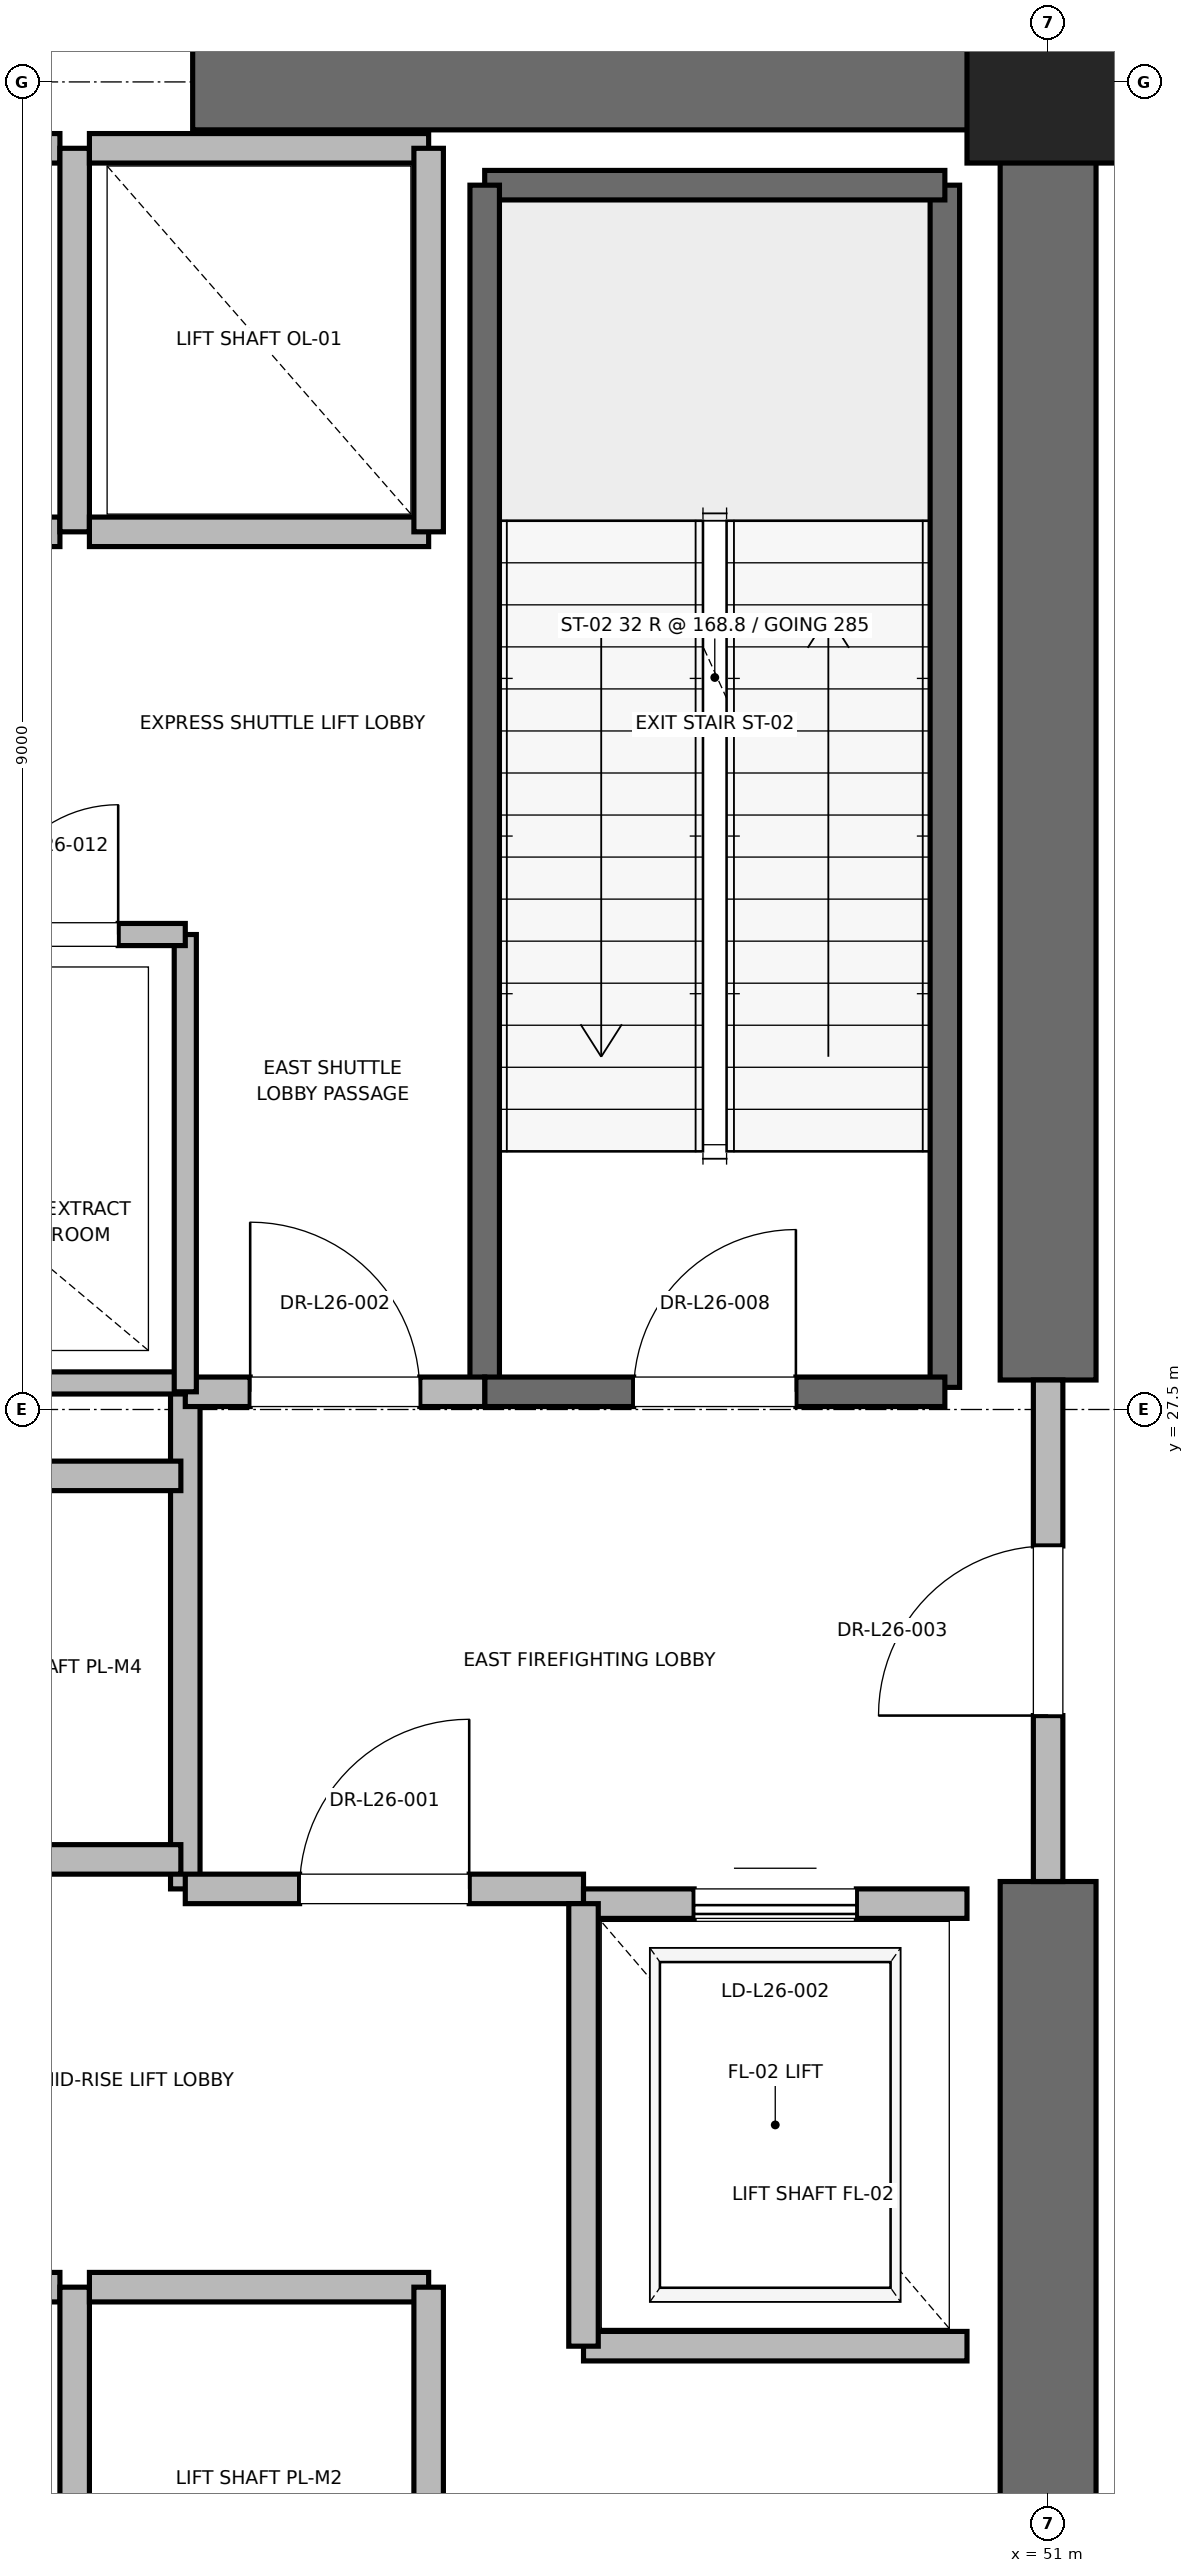
"""IFC4 building model, lengths in metres.
Left out: names, types, materials, properties, quantities, classifications, styles, units other than length and angle.
Written with IfcOpenShell. Run it as: python <this file> out.ifc"""

import sys

from ifc_helpers import new_model, si_unit, direction, frame, frame_2d, origin, origin_2d, place, context, subcontext, project, spatial, rectangle, extrude, element, fill, save


model = new_model("IFC4")
c1 = context("Model", 3, precision=1e-05, world=origin(), true_north=direction((0.0, 1.0)))
c2 = subcontext(c1, "Body", "Model", "MODEL_VIEW")
j1 = project(units=[si_unit("LENGTHUNIT", "METRE"), si_unit("PLANEANGLEUNIT", "RADIAN")], contexts=[c1])
p1 = place(None, origin())
s1 = spatial("IfcSite", under=j1, at=p1, CompositionType="ELEMENT")
p2 = place(p1, origin())
s2 = spatial("IfcBuilding", under=s1, at=p2, CompositionType="ELEMENT")
p3 = place(p2, frame((0.0, 0.0, 113.0)))
s3 = spatial("IfcBuildingStorey", under=s2, at=p3, CompositionType="ELEMENT", Elevation=113.0)
p4 = place(p3, frame((51.0, 36.5, 0.0), z_axis=(0.0, 0.0, 1.0), x_axis=(1.0, 0.0, 0.0)))
e1 = element("IfcColumn", 1, at=p4, inside=s3, PredefinedType="PILASTER", context=c2, shape_type="SweptSolid", body=[
    extrude(rectangle(XDim=1.1, YDim=1.1, at=origin_2d()), origin(), (0.0, 0.0, 1.0), 5.4),
])
for number, where, z_axis, x_axis in (
    (2, (45.2, 36.5, 0.0), (0.0, 0.0, 1.0), (1.0, 0.0, 0.0)),
    (3, (51.0, 18.5, 0.0), (0.0, 0.0, 1.0), (0.0, 1.0, 0.0)),
):
    element("IfcWall", number, at=place(p3, frame(where, z_axis=z_axis, x_axis=x_axis)), inside=s3, PredefinedType="SHEAR", context=c2, shape_type="SweptSolid", body=[
        extrude(rectangle(XDim=5.8, YDim=0.65, at=frame_2d((2.9, 0.0))), origin(), (0.0, 0.0, 1.0), 5.1),
    ])
p5 = place(p3, frame((51.0, 27.7, 0.0), z_axis=(0.0, 0.0, 1.0), x_axis=(0.0, 1.0, 0.0)))
e4 = element("IfcWall", 4, at=p5, inside=s3, PredefinedType="SHEAR", context=c2, shape_type="SweptSolid", body=[
    extrude(rectangle(XDim=8.8, YDim=0.65, at=frame_2d((4.4, 0.0))), origin(), (0.0, 0.0, 1.0), 5.1),
])
p6 = place(p3, frame((50.3, 27.65, 0.0), z_axis=(0.0, 0.0, 1.0), x_axis=(0.0, 1.0, 0.0)))
e5 = element("IfcWall", 5, at=p6, inside=s3, PredefinedType="SOLIDWALL", context=c2, shape_type="SweptSolid", body=[
    extrude(rectangle(XDim=8.15, YDim=0.2, at=frame_2d((4.075, 0.0))), origin(), (0.0, 0.0, 1.0), 5.1),
])
p7 = place(p3, frame((47.18, 35.8, 0.0), z_axis=(0.0, 0.0, 1.0), x_axis=(1.0, 0.0, 0.0)))
e6 = element("IfcWall", 6, at=p7, inside=s3, PredefinedType="SOLIDWALL", context=c2, shape_type="SweptSolid", body=[
    extrude(rectangle(XDim=3.12, YDim=0.2, at=frame_2d((1.56, 0.0))), origin(), (0.0, 0.0, 1.0), 5.1),
])
p8 = place(p3, frame((47.18, 27.62, 0.0), z_axis=(0.0, 0.0, 1.0), x_axis=(0.0, 1.0, 0.0)))
e7 = element("IfcWall", 7, at=p8, inside=s3, PredefinedType="SOLIDWALL", context=c2, shape_type="SweptSolid", body=[
    extrude(rectangle(XDim=8.18, YDim=0.2, at=frame_2d((4.09, 0.0))), origin(), (0.0, 0.0, 1.0), 5.1),
])
p9 = place(p3, frame((47.18, 27.62, 0.0), z_axis=(0.0, 0.0, 1.0), x_axis=(1.0, 0.0, 0.0)))
e8 = element("IfcWall", 8, at=p9, inside=s3, PredefinedType="SOLIDWALL", context=c2, shape_type="SweptSolid", body=[
    extrude(rectangle(XDim=3.12, YDim=0.2, at=frame_2d((1.56, 0.0))), origin(), (0.0, 0.0, 1.0), 5.1),
])
p10 = place(p9, frame((1.01, 0.0, 0.0)))
e9 = element("IfcOpeningElement", 9, at=p10, cuts=e8, PredefinedType="OPENING", context=c2, shape_type="SweptSolid", body=[
    extrude(rectangle(XDim=1.1, YDim=2.15, at=frame_2d((0.55, 1.075))), frame((0.0, 0.1, 0.0), z_axis=(0.0, -1.0, 0.0), x_axis=(1.0, 0.0, 0.0)), (0.0, 0.0, 1.0), 0.2),
])
p11 = place(p3, frame((45.15, 24.25, 0.0), z_axis=(0.0, 0.0, 1.0), x_axis=(0.0, 1.0, 0.0)))
e10 = element("IfcWall", 10, at=p11, inside=s3, PredefinedType="PARTITIONING", context=c2, shape_type="SweptSolid", body=[
    extrude(rectangle(XDim=3.37, YDim=0.2, at=frame_2d((1.685, 0.0))), origin(), (0.0, 0.0, 1.0), 5.1),
])
p12 = place(p3, frame((45.15, 24.25, 0.0), z_axis=(0.0, 0.0, 1.0), x_axis=(1.0, 0.0, 0.0)))
e11 = element("IfcWall", 11, at=p12, inside=s3, PredefinedType="PARTITIONING", context=c2, shape_type="SweptSolid", body=[
    extrude(rectangle(XDim=2.7, YDim=0.2, at=frame_2d((1.35, 0.0))), origin(), (0.0, 0.0, 1.0), 5.1),
])
p13 = place(p12, frame((0.775, 0.0, 0.0)))
e12 = element("IfcOpeningElement", 12, at=p13, cuts=e11, PredefinedType="OPENING", context=c2, shape_type="SweptSolid", body=[
    extrude(rectangle(XDim=1.15, YDim=2.2, at=frame_2d((0.575, 1.1))), frame((0.0, 0.1, 0.0), z_axis=(0.0, -1.0, 0.0), x_axis=(1.0, 0.0, 0.0)), (0.0, 0.0, 1.0), 0.2),
])
p14 = place(p3, frame((45.15, 27.62, 0.0), z_axis=(0.0, 0.0, 1.0), x_axis=(1.0, 0.0, 0.0)))
e13 = element("IfcWall", 13, at=p14, inside=s3, PredefinedType="PARTITIONING", context=c2, shape_type="SweptSolid", body=[
    extrude(rectangle(XDim=2.03, YDim=0.2, at=frame_2d((1.015, 0.0))), origin(), (0.0, 0.0, 1.0), 5.1),
])
p15 = place(p14, frame((0.44, 0.0, 0.0)))
e14 = element("IfcOpeningElement", 14, at=p15, cuts=e13, PredefinedType="OPENING", context=c2, shape_type="SweptSolid", body=[
    extrude(rectangle(XDim=1.15, YDim=2.2, at=frame_2d((0.575, 1.1))), frame((0.0, 0.1, 0.0), z_axis=(0.0, -1.0, 0.0), x_axis=(1.0, 0.0, 0.0)), (0.0, 0.0, 1.0), 0.2),
])
p16 = place(p3, frame((51.0, 24.3, 0.0), z_axis=(0.0, 0.0, 1.0), x_axis=(0.0, 1.0, 0.0)))
e15 = element("IfcWall", 15, at=p16, inside=s3, PredefinedType="PARTITIONING", context=c2, shape_type="SweptSolid", body=[
    extrude(rectangle(XDim=3.4, YDim=0.2, at=frame_2d((1.7, 0.0))), origin(), (0.0, 0.0, 1.0), 3.88),
])
p17 = place(p16, frame((1.125, 0.0, 0.0)))
e16 = element("IfcOpeningElement", 16, at=p17, cuts=e15, PredefinedType="OPENING", context=c2, shape_type="SweptSolid", body=[
    extrude(rectangle(XDim=1.15, YDim=2.2, at=frame_2d((0.575, 1.1))), frame((0.0, 0.1, 0.0), z_axis=(0.0, -1.0, 0.0), x_axis=(1.0, 0.0, 0.0)), (0.0, 0.0, 1.0), 0.2),
])
p18 = place(p3, frame((47.85, 21.15, 0.0), z_axis=(0.0, 0.0, 1.0), x_axis=(1.0, 0.0, 0.0)))
e17 = element("IfcWall", 17, at=p18, inside=s3, PredefinedType="SOLIDWALL", context=c2, shape_type="SweptSolid", body=[
    extrude(rectangle(XDim=2.6, YDim=0.2, at=frame_2d((1.3, 0.0))), origin(), (0.0, 0.0, 1.0), 5.1),
])
p19 = place(p3, frame((50.45, 24.15, 0.0), z_axis=(0.0, 0.0, 1.0), x_axis=(-1.0, 0.0, 0.0)))
e18 = element("IfcWall", 18, at=p19, inside=s3, PredefinedType="SOLIDWALL", context=c2, shape_type="SweptSolid", body=[
    extrude(rectangle(XDim=2.6, YDim=0.2, at=frame_2d((1.3, 0.0))), origin(), (0.0, 0.0, 1.0), 3.88),
])
p20 = place(p19, frame((0.75, 0.0, 0.0)))
e19 = element("IfcOpeningElement", 19, at=p20, cuts=e18, PredefinedType="OPENING", context=c2, shape_type="SweptSolid", body=[
    extrude(rectangle(XDim=1.1, YDim=2.2, at=frame_2d((0.55, 1.1))), frame((0.0, 0.1, 0.0), z_axis=(0.0, -1.0, 0.0), x_axis=(1.0, 0.0, 0.0)), (0.0, 0.0, 1.0), 0.2),
])
p21 = place(p3, frame((47.85, 24.15, 0.0), z_axis=(0.0, 0.0, 1.0), x_axis=(0.0, -1.0, 0.0)))
e20 = element("IfcWall", 20, at=p21, inside=s3, PredefinedType="SOLIDWALL", context=c2, shape_type="SweptSolid", body=[
    extrude(rectangle(XDim=3.0, YDim=0.2, at=frame_2d((1.5, 0.0))), origin(), (0.0, 0.0, 1.0), 5.1),
])
p22 = place(p3, frame((44.3, 21.55, 0.0), z_axis=(0.0, 0.0, 1.0), x_axis=(-1.0, 0.0, 0.0)))
e21 = element("IfcWall", 21, at=p22, inside=s3, PredefinedType="SOLIDWALL", context=c2, shape_type="SweptSolid", body=[
    extrude(rectangle(XDim=2.3, YDim=0.2, at=frame_2d((1.15, 0.0))), origin(), (0.0, 0.0, 1.0), 5.1),
])
p23 = place(p3, frame((44.4, 18.95, 0.0), z_axis=(0.0, 0.0, 1.0), x_axis=(0.0, 1.0, 0.0)))
e22 = element("IfcWall", 22, at=p23, inside=s3, PredefinedType="SOLIDWALL", context=c2, shape_type="SweptSolid", body=[
    extrude(rectangle(XDim=2.6, YDim=0.2, at=frame_2d((1.3, 0.0))), origin(), (0.0, 0.0, 1.0), 5.1),
])
p24 = place(p3, frame((46.8, 21.55, 0.0), z_axis=(0.0, 0.0, 1.0), x_axis=(-1.0, 0.0, 0.0)))
e23 = element("IfcWall", 23, at=p24, inside=s3, PredefinedType="SOLIDWALL", context=c2, shape_type="SweptSolid", body=[
    extrude(rectangle(XDim=2.3, YDim=0.2, at=frame_2d((1.15, 0.0))), origin(), (0.0, 0.0, 1.0), 5.1),
])
p25 = place(p3, frame((46.8, 18.95, 0.0), z_axis=(0.0, 0.0, 1.0), x_axis=(0.0, 1.0, 0.0)))
e24 = element("IfcWall", 24, at=p25, inside=s3, PredefinedType="SOLIDWALL", context=c2, shape_type="SweptSolid", body=[
    extrude(rectangle(XDim=2.6, YDim=0.2, at=frame_2d((1.3, 0.0))), origin(), (0.0, 0.0, 1.0), 5.1),
])
for number, where, z_axis, x_axis in (
    (25, (43.46, 24.45, 0.0), (0.0, 0.0, 1.0), (1.0, 0.0, 0.0)),
    (26, (45.12, 27.05, 0.0), (0.0, 0.0, 1.0), (-1.0, 0.0, 0.0)),
):
    element("IfcWall", number, at=place(p3, frame(where, z_axis=z_axis, x_axis=x_axis)), inside=s3, PredefinedType="SOLIDWALL", context=c2, shape_type="SweptSolid", body=[
        extrude(rectangle(XDim=1.66, YDim=0.2, at=frame_2d((0.83, 0.0))), origin(), (0.0, 0.0, 1.0), 5.1),
    ])
p26 = place(p3, frame((42.0, 33.45, 0.0), z_axis=(0.0, 0.0, 1.0), x_axis=(1.0, 0.0, 0.0)))
e27 = element("IfcWall", 27, at=p26, inside=s3, PredefinedType="SOLIDWALL", context=c2, shape_type="SweptSolid", body=[
    extrude(rectangle(XDim=2.3, YDim=0.2, at=frame_2d((1.15, 0.0))), origin(), (0.0, 0.0, 1.0), 5.1),
])
p27 = place(p3, frame((44.3, 36.05, 0.0), z_axis=(0.0, 0.0, 1.0), x_axis=(-1.0, 0.0, 0.0)))
e28 = element("IfcWall", 28, at=p27, inside=s3, PredefinedType="SOLIDWALL", context=c2, shape_type="SweptSolid", body=[
    extrude(rectangle(XDim=2.3, YDim=0.2, at=frame_2d((1.15, 0.0))), origin(), (0.0, 0.0, 1.0), 3.88),
])
p28 = place(p3, frame((44.4, 33.45, 0.0), z_axis=(0.0, 0.0, 1.0), x_axis=(0.0, 1.0, 0.0)))
e29 = element("IfcWall", 29, at=p28, inside=s3, PredefinedType="SOLIDWALL", context=c2, shape_type="SweptSolid", body=[
    extrude(rectangle(XDim=2.6, YDim=0.2, at=frame_2d((1.3, 0.0))), origin(), (0.0, 0.0, 1.0), 3.88),
])
p29 = place(p3, frame((44.5, 33.45, 0.0), z_axis=(0.0, 0.0, 1.0), x_axis=(1.0, 0.0, 0.0)))
e30 = element("IfcWall", 30, at=p29, inside=s3, PredefinedType="SOLIDWALL", context=c2, shape_type="SweptSolid", body=[
    extrude(rectangle(XDim=2.3, YDim=0.2, at=frame_2d((1.15, 0.0))), origin(), (0.0, 0.0, 1.0), 5.1),
])
p30 = place(p3, frame((46.8, 36.05, 0.0), z_axis=(0.0, 0.0, 1.0), x_axis=(-1.0, 0.0, 0.0)))
e31 = element("IfcWall", 31, at=p30, inside=s3, PredefinedType="SOLIDWALL", context=c2, shape_type="SweptSolid", body=[
    extrude(rectangle(XDim=2.3, YDim=0.2, at=frame_2d((1.15, 0.0))), origin(), (0.0, 0.0, 1.0), 3.88),
])
p31 = place(p3, frame((46.8, 33.45, 0.0), z_axis=(0.0, 0.0, 1.0), x_axis=(0.0, 1.0, 0.0)))
e32 = element("IfcWall", 32, at=p31, inside=s3, PredefinedType="SOLIDWALL", context=c2, shape_type="SweptSolid", body=[
    extrude(rectangle(XDim=2.6, YDim=0.2, at=frame_2d((1.3, 0.0))), origin(), (0.0, 0.0, 1.0), 5.1),
])
p32 = place(p3, frame((41.56, 27.68, 0.0), z_axis=(0.0, 0.0, 1.0), x_axis=(1.0, 0.0, 0.0)))
e33 = element("IfcWall", 33, at=p32, inside=s3, PredefinedType="PARTITIONING", context=c2, shape_type="SweptSolid", body=[
    extrude(rectangle(XDim=3.59, YDim=0.15, at=frame_2d((1.795, 0.0))), origin(), (0.0, 0.0, 1.0), 2.85),
])
p33 = place(p3, frame((45.15, 27.62, 0.0), z_axis=(0.0, 0.0, 1.0), x_axis=(0.0, 1.0, 0.0)))
e34 = element("IfcWall", 34, at=p33, inside=s3, PredefinedType="PARTITIONING", context=c2, shape_type="SweptSolid", body=[
    extrude(rectangle(XDim=3.1, YDim=0.15, at=frame_2d((1.55, 0.0))), origin(), (0.0, 0.0, 1.0), 2.85),
])
p34 = place(p3, frame((43.36, 30.72, 0.0), z_axis=(0.0, 0.0, 1.0), x_axis=(1.0, 0.0, 0.0)))
e35 = element("IfcWall", 35, at=p34, inside=s3, PredefinedType="PARTITIONING", context=c2, shape_type="SweptSolid", body=[
    extrude(rectangle(XDim=1.79, YDim=0.15, at=frame_2d((0.895, 0.0))), origin(), (0.0, 0.0, 1.0), 2.85),
])
p35 = place(p34, frame((0.455, 0.0, 0.0)))
e36 = element("IfcOpeningElement", 36, at=p35, cuts=e35, PredefinedType="OPENING", context=c2, shape_type="SweptSolid", body=[
    extrude(rectangle(XDim=0.88, YDim=2.1, at=frame_2d((0.44, 1.05))), frame((0.0, 0.075, 0.0), z_axis=(0.0, -1.0, 0.0), x_axis=(1.0, 0.0, 0.0)), (0.0, 0.0, 1.0), 0.15),
])
p36 = place(p10, origin())
e37 = element("IfcDoor", 37, at=p36, inside=s3, OperationType="SINGLE_SWING_RIGHT", PredefinedType="DOOR", context=c2, shape_type="SweptSolid", body=[
    extrude(rectangle(XDim=1.1, YDim=2.15, at=frame_2d((0.55, 1.075))), frame((0.0, 0.025, 0.0), z_axis=(0.0, -1.0, 0.0), x_axis=(1.0, 0.0, 0.0)), (0.0, 0.0, 1.0), 0.05),
])
fill(e9, e37)
p37 = place(p13, origin())
e38 = element("IfcDoor", 38, at=p37, inside=s3, OperationType="SINGLE_SWING_RIGHT", PredefinedType="DOOR", context=c2, shape_type="SweptSolid", body=[
    extrude(rectangle(XDim=1.15, YDim=2.2, at=frame_2d((0.575, 1.1))), frame((0.0, 0.025, 0.0), z_axis=(0.0, -1.0, 0.0), x_axis=(1.0, 0.0, 0.0)), (0.0, 0.0, 1.0), 0.05),
])
fill(e12, e38)
p38 = place(p15, origin())
e39 = element("IfcDoor", 39, at=p38, inside=s3, OperationType="SINGLE_SWING_LEFT", PredefinedType="DOOR", context=c2, shape_type="SweptSolid", body=[
    extrude(rectangle(XDim=1.15, YDim=2.2, at=frame_2d((0.575, 1.1))), frame((0.0, 0.025, 0.0), z_axis=(0.0, -1.0, 0.0), x_axis=(1.0, 0.0, 0.0)), (0.0, 0.0, 1.0), 0.05),
])
fill(e14, e39)
p39 = place(p17, origin())
e40 = element("IfcDoor", 40, at=p39, inside=s3, OperationType="SINGLE_SWING_LEFT", PredefinedType="DOOR", context=c2, shape_type="SweptSolid", body=[
    extrude(rectangle(XDim=1.15, YDim=2.2, at=frame_2d((0.575, 1.1))), frame((0.0, 0.025, 0.0), z_axis=(0.0, -1.0, 0.0), x_axis=(1.0, 0.0, 0.0)), (0.0, 0.0, 1.0), 0.05),
])
fill(e16, e40)
p40 = place(p20, origin())
e41 = element("IfcDoor", 41, at=p40, inside=s3, OperationType="SLIDING_TO_RIGHT", PredefinedType="DOOR", context=c2, shape_type="SweptSolid", body=[
    extrude(rectangle(XDim=1.1, YDim=2.2, at=frame_2d((0.55, 1.1))), frame((0.0, 0.025, 0.0), z_axis=(0.0, -1.0, 0.0), x_axis=(1.0, 0.0, 0.0)), (0.0, 0.0, 1.0), 0.05),
])
fill(e19, e41)
p41 = place(p35, origin())
e42 = element("IfcDoor", 42, at=p41, inside=s3, OperationType="SINGLE_SWING_RIGHT", PredefinedType="DOOR", context=c2, shape_type="SweptSolid", body=[
    extrude(rectangle(XDim=0.88, YDim=2.1, at=frame_2d((0.44, 1.05))), frame((0.0, 0.025, 0.0), z_axis=(0.0, -1.0, 0.0), x_axis=(1.0, 0.0, 0.0)), (0.0, 0.0, 1.0), 0.05),
])
fill(e36, e42)
save(model, sys.argv[1])
